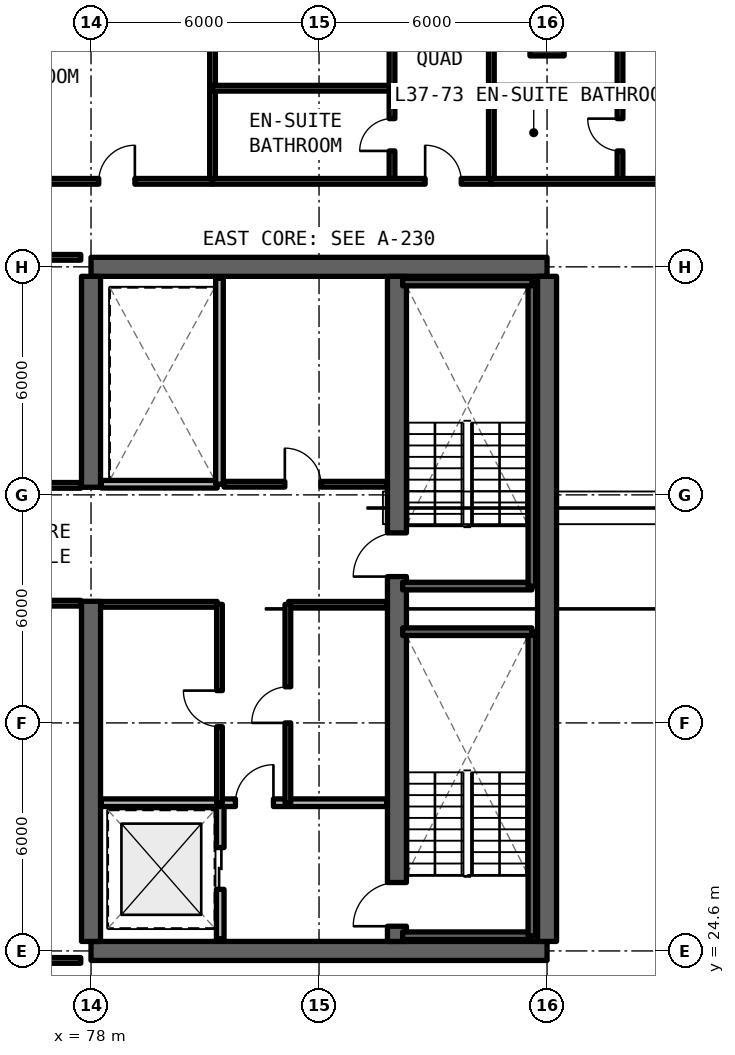
"""IFC4 building model, lengths in metres.
Left out: names, types, materials, properties, quantities, classifications, styles, units other than length and angle.
Written with IfcOpenShell. Run it as: python <this file> out.ifc"""

import sys

from ifc_helpers import new_model, si_unit, direction, frame, frame_2d, origin, origin_2d, place, context, subcontext, project, spatial, rectangle, extrude, element, fill, save


model = new_model("IFC4")
c1 = context("Model", 3, precision=1e-05, world=origin(), true_north=direction((0.0, 1.0)))
c2 = subcontext(c1, "Body", "Model", "MODEL_VIEW")
j1 = project(units=[si_unit("LENGTHUNIT", "METRE"), si_unit("PLANEANGLEUNIT", "RADIAN")], contexts=[c1])
p1 = place(None, origin())
s1 = spatial("IfcSite", under=j1, at=p1, CompositionType="ELEMENT")
p2 = place(p1, origin())
s2 = spatial("IfcBuilding", under=s1, at=p2, CompositionType="ELEMENT")
p3 = place(p2, frame((0.0, 0.0, 135.3)))
s3 = spatial("IfcBuildingStorey", under=s2, at=p3, CompositionType="ELEMENT", Elevation=135.3)
for number, where, z_axis, x_axis in (
    (1, (78.0, 24.6, 0.0), (0.0, 0.0, 1.0), (1.0, 0.0, 0.0)),
    (2, (90.0, 42.6, 0.0), (0.0, 0.0, 1.0), (-1.0, 0.0, 0.0)),
):
    element("IfcWall", number, at=place(p3, frame(where, z_axis=z_axis, x_axis=x_axis)), inside=s3, PredefinedType="SHEAR", context=c2, shape_type="SweptSolid", body=[
        extrude(rectangle(XDim=12.0, YDim=0.5, at=frame_2d((6.0, 0.0))), origin(), (0.0, 0.0, 1.0), 3.3),
    ])
p4 = place(p3, frame((90.0, 24.85, 0.0), z_axis=(0.0, 0.0, 1.0), x_axis=(0.0, 1.0, 0.0)))
e3 = element("IfcWall", 3, at=p4, inside=s3, PredefinedType="SHEAR", context=c2, shape_type="SweptSolid", body=[
    extrude(rectangle(XDim=17.5, YDim=0.5, at=frame_2d((8.75, 0.0))), origin(), (0.0, 0.0, 1.0), 3.3),
])
p5 = place(p3, frame((78.0, 24.85, 0.0), z_axis=(0.0, 0.0, 1.0), x_axis=(0.0, 1.0, 0.0)))
e4 = element("IfcWall", 4, at=p5, inside=s3, PredefinedType="SHEAR", context=c2, shape_type="SweptSolid", body=[
    extrude(rectangle(XDim=8.95, YDim=0.5, at=frame_2d((4.475, 0.0))), origin(), (0.0, 0.0, 1.0), 3.3),
])
p6 = place(p3, frame((78.0, 36.8, 0.0), z_axis=(0.0, 0.0, 1.0), x_axis=(0.0, 1.0, 0.0)))
e5 = element("IfcWall", 5, at=p6, inside=s3, PredefinedType="SHEAR", context=c2, shape_type="SweptSolid", body=[
    extrude(rectangle(XDim=5.55, YDim=0.5, at=frame_2d((2.775, 0.0))), origin(), (0.0, 0.0, 1.0), 3.3),
])
p7 = place(p3, frame((86.05, 24.85, 0.0), z_axis=(0.0, 0.0, 1.0), x_axis=(0.0, 1.0, 0.0)))
e6 = element("IfcWall", 6, at=p7, inside=s3, PredefinedType="SHEAR", context=c2, shape_type="SweptSolid", body=[
    extrude(rectangle(XDim=17.5, YDim=0.5, at=frame_2d((8.75, 0.0))), origin(), (0.0, 0.0, 1.0), 3.3),
])
p8 = place(p7, frame((0.4, 0.0, 0.0)))
e7 = element("IfcOpeningElement", 7, at=p8, cuts=e6, PredefinedType="OPENING", context=c2, shape_type="SweptSolid", body=[
    extrude(rectangle(XDim=1.15, YDim=2.15, at=frame_2d((0.575, 1.075))), frame((0.0, 0.26, 0.0), z_axis=(0.0, -1.0, 0.0), x_axis=(1.0, 0.0, 0.0)), (0.0, 0.0, 1.0), 0.52),
])
p9 = place(p7, frame((9.6, 0.0, 0.0)))
e8 = element("IfcOpeningElement", 8, at=p9, cuts=e6, PredefinedType="OPENING", context=c2, shape_type="SweptSolid", body=[
    extrude(rectangle(XDim=1.15, YDim=2.15, at=frame_2d((0.575, 1.075))), frame((0.0, 0.26, 0.0), z_axis=(0.0, -1.0, 0.0), x_axis=(1.0, 0.0, 0.0)), (0.0, 0.0, 1.0), 0.52),
])
p10 = place(p3, frame((90.0, 48.6, 0.0), z_axis=(0.0, 0.0, 1.0), x_axis=(1.0, 0.0, 0.0)))
e9 = element("IfcColumn", 9, at=p10, inside=s3, PredefinedType="COLUMN", context=c2, shape_type="SweptSolid", body=[
    extrude(rectangle(XDim=0.9, YDim=0.9, at=origin_2d()), origin(), (0.0, 0.0, 1.0), 3.3),
])
p11 = place(p3, frame((81.4, 24.92, 0.0), z_axis=(0.0, 0.0, 1.0), x_axis=(0.0, 1.0, 0.0)))
e10 = element("IfcWall", 10, at=p11, inside=s3, PredefinedType="SOLIDWALL", context=c2, shape_type="SweptSolid", body=[
    extrude(rectangle(XDim=3.58, YDim=0.2, at=frame_2d((1.79, 0.0))), origin(), (0.0, 0.0, 1.0), 2.35),
])
p12 = place(p11, frame((1.3, 0.0, 0.0)))
e11 = element("IfcOpeningElement", 11, at=p12, cuts=e10, PredefinedType="OPENING", context=c2, shape_type="SweptSolid", body=[
    extrude(rectangle(XDim=1.1, YDim=2.2, at=frame_2d((0.55, 1.1))), frame((0.0, 0.11, 0.0), z_axis=(0.0, -1.0, 0.0), x_axis=(1.0, 0.0, 0.0)), (0.0, 0.0, 1.0), 0.22),
])
p13 = place(p3, frame((78.27, 28.5, 0.0), z_axis=(0.0, 0.0, 1.0), x_axis=(1.0, 0.0, 0.0)))
e12 = element("IfcWall", 12, at=p13, inside=s3, PredefinedType="SOLIDWALL", context=c2, shape_type="SweptSolid", body=[
    extrude(rectangle(XDim=7.51, YDim=0.2, at=frame_2d((3.755, 0.0))), origin(), (0.0, 0.0, 1.0), 2.35),
])
p14 = place(p13, frame((3.53, 0.0, 0.0)))
e13 = element("IfcOpeningElement", 13, at=p14, cuts=e12, PredefinedType="OPENING", context=c2, shape_type="SweptSolid", body=[
    extrude(rectangle(XDim=1.0, YDim=2.15, at=frame_2d((0.5, 1.075))), frame((0.0, 0.11, 0.0), z_axis=(0.0, -1.0, 0.0), x_axis=(1.0, 0.0, 0.0)), (0.0, 0.0, 1.0), 0.22),
])
p15 = place(p3, frame((83.2, 33.72, 0.0), z_axis=(0.0, 0.0, 1.0), x_axis=(1.0, 0.0, 0.0)))
e14 = element("IfcWall", 14, at=p15, inside=s3, PredefinedType="SOLIDWALL", context=c2, shape_type="SweptSolid", body=[
    extrude(rectangle(XDim=2.58, YDim=0.15, at=frame_2d((1.29, 0.0))), origin(), (0.0, 0.0, 1.0), 2.35),
])
p16 = place(p3, frame((83.18, 28.5, 0.0), z_axis=(0.0, 0.0, 1.0), x_axis=(0.0, 1.0, 0.0)))
e15 = element("IfcWall", 15, at=p16, inside=s3, PredefinedType="SOLIDWALL", context=c2, shape_type="SweptSolid", body=[
    extrude(rectangle(XDim=5.22, YDim=0.15, at=frame_2d((2.61, 0.0))), origin(), (0.0, 0.0, 1.0), 2.35),
])
p17 = place(p16, frame((2.1, 0.0, 0.0)))
e16 = element("IfcOpeningElement", 16, at=p17, cuts=e15, PredefinedType="OPENING", context=c2, shape_type="SweptSolid", body=[
    extrude(rectangle(XDim=0.95, YDim=2.15, at=frame_2d((0.475, 1.075))), frame((0.0, 0.085, 0.0), z_axis=(0.0, -1.0, 0.0), x_axis=(1.0, 0.0, 0.0)), (0.0, 0.0, 1.0), 0.17),
])
p18 = place(p3, frame((78.27, 33.72, 0.0), z_axis=(0.0, 0.0, 1.0), x_axis=(1.0, 0.0, 0.0)))
e17 = element("IfcWall", 17, at=p18, inside=s3, PredefinedType="SOLIDWALL", context=c2, shape_type="SweptSolid", body=[
    extrude(rectangle(XDim=3.05, YDim=0.15, at=frame_2d((1.525, 0.0))), origin(), (0.0, 0.0, 1.0), 2.35),
])
p19 = place(p3, frame((81.38, 28.5, 0.0), z_axis=(0.0, 0.0, 1.0), x_axis=(0.0, 1.0, 0.0)))
e18 = element("IfcWall", 18, at=p19, inside=s3, PredefinedType="SOLIDWALL", context=c2, shape_type="SweptSolid", body=[
    extrude(rectangle(XDim=5.22, YDim=0.15, at=frame_2d((2.61, 0.0))), origin(), (0.0, 0.0, 1.0), 2.35),
])
p20 = place(p19, frame((2.0, 0.0, 0.0)))
e19 = element("IfcOpeningElement", 19, at=p20, cuts=e18, PredefinedType="OPENING", context=c2, shape_type="SweptSolid", body=[
    extrude(rectangle(XDim=0.95, YDim=2.15, at=frame_2d((0.475, 1.075))), frame((0.0, 0.085, 0.0), z_axis=(0.0, -1.0, 0.0), x_axis=(1.0, 0.0, 0.0)), (0.0, 0.0, 1.0), 0.17),
])
p21 = place(p3, frame((81.5, 36.88, 0.0), z_axis=(0.0, 0.0, 1.0), x_axis=(1.0, 0.0, 0.0)))
e20 = element("IfcWall", 20, at=p21, inside=s3, PredefinedType="SOLIDWALL", context=c2, shape_type="SweptSolid", body=[
    extrude(rectangle(XDim=4.28, YDim=0.15, at=frame_2d((2.14, 0.0))), origin(), (0.0, 0.0, 1.0), 2.35),
])
p22 = place(p21, frame((1.6, 0.0, 0.0)))
e21 = element("IfcOpeningElement", 21, at=p22, cuts=e20, PredefinedType="OPENING", context=c2, shape_type="SweptSolid", body=[
    extrude(rectangle(XDim=0.95, YDim=2.15, at=frame_2d((0.475, 1.075))), frame((0.0, 0.085, 0.0), z_axis=(0.0, -1.0, 0.0), x_axis=(1.0, 0.0, 0.0)), (0.0, 0.0, 1.0), 0.17),
])
p23 = place(p3, frame((78.27, 36.88, 0.0), z_axis=(0.0, 0.0, 1.0), x_axis=(1.0, 0.0, 0.0)))
e22 = element("IfcWall", 22, at=p23, inside=s3, PredefinedType="SOLIDWALL", context=c2, shape_type="SweptSolid", body=[
    extrude(rectangle(XDim=3.05, YDim=0.2, at=frame_2d((1.525, 0.0))), origin(), (0.0, 0.0, 1.0), 2.35),
])
p24 = place(p3, frame((81.38, 36.88, 0.0), z_axis=(0.0, 0.0, 1.0), x_axis=(0.0, 1.0, 0.0)))
e23 = element("IfcWall", 23, at=p24, inside=s3, PredefinedType="SOLIDWALL", context=c2, shape_type="SweptSolid", body=[
    extrude(rectangle(XDim=5.42, YDim=0.2, at=frame_2d((2.71, 0.0))), origin(), (0.0, 0.0, 1.0), 2.35),
])
p25 = place(p3, frame((69.85, 24.35, 0.0), z_axis=(0.0, 0.0, 1.0), x_axis=(1.0, 0.0, 0.0)))
e24 = element("IfcWall", 24, at=p25, inside=s3, PredefinedType="SOLIDWALL", context=c2, shape_type="SweptSolid", body=[
    extrude(rectangle(XDim=7.88, YDim=0.15, at=frame_2d((3.94, 0.0))), origin(), (0.0, 0.0, 1.0), 2.35),
])
p26 = place(p3, frame((69.85, 33.75, 0.0), z_axis=(0.0, 0.0, 1.0), x_axis=(1.0, 0.0, 0.0)))
e25 = element("IfcWall", 25, at=p26, inside=s3, PredefinedType="SOLIDWALL", context=c2, shape_type="SweptSolid", body=[
    extrude(rectangle(XDim=7.88, YDim=0.15, at=frame_2d((3.94, 0.0))), origin(), (0.0, 0.0, 1.0), 2.35),
])
p27 = place(p26, frame((3.465, 0.0, 0.0)))
e26 = element("IfcOpeningElement", 26, at=p27, cuts=e25, PredefinedType="OPENING", context=c2, shape_type="SweptSolid", body=[
    extrude(rectangle(XDim=0.95, YDim=2.15, at=frame_2d((0.475, 1.075))), frame((0.0, 0.085, 0.0), z_axis=(0.0, -1.0, 0.0), x_axis=(1.0, 0.0, 0.0)), (0.0, 0.0, 1.0), 0.17),
])
p28 = place(p3, frame((69.85, 36.85, 0.0), z_axis=(0.0, 0.0, 1.0), x_axis=(1.0, 0.0, 0.0)))
e27 = element("IfcWall", 27, at=p28, inside=s3, PredefinedType="SOLIDWALL", context=c2, shape_type="SweptSolid", body=[
    extrude(rectangle(XDim=7.88, YDim=0.15, at=frame_2d((3.94, 0.0))), origin(), (0.0, 0.0, 1.0), 2.35),
])
p29 = place(p28, frame((3.465, 0.0, 0.0)))
e28 = element("IfcOpeningElement", 28, at=p29, cuts=e27, PredefinedType="OPENING", context=c2, shape_type="SweptSolid", body=[
    extrude(rectangle(XDim=0.95, YDim=2.15, at=frame_2d((0.475, 1.075))), frame((0.0, 0.085, 0.0), z_axis=(0.0, -1.0, 0.0), x_axis=(1.0, 0.0, 0.0)), (0.0, 0.0, 1.0), 0.17),
])
p30 = place(p3, frame((69.85, 42.85, 0.0), z_axis=(0.0, 0.0, 1.0), x_axis=(1.0, 0.0, 0.0)))
e29 = element("IfcWall", 29, at=p30, inside=s3, PredefinedType="SOLIDWALL", context=c2, shape_type="SweptSolid", body=[
    extrude(rectangle(XDim=7.88, YDim=0.15, at=frame_2d((3.94, 0.0))), origin(), (0.0, 0.0, 1.0), 2.35),
])
p31 = place(p3, frame((81.197, 44.85, 0.0), z_axis=(0.0, 0.0, 1.0), x_axis=(0.0, 1.0, 0.0)))
e30 = element("IfcWall", 30, at=p31, inside=s3, PredefinedType="SOLIDWALL", context=c2, shape_type="SweptSolid", body=[
    extrude(rectangle(XDim=10.2, YDim=0.15, at=frame_2d((5.1, 0.0))), origin(), (0.0, 0.0, 1.0), 2.35),
])
p32 = place(p3, frame((74.132, 44.85, 0.0), z_axis=(0.0, 0.0, 1.0), x_axis=(1.0, 0.0, 0.0)))
e31 = element("IfcWall", 31, at=p32, inside=s3, PredefinedType="SOLIDWALL", context=c2, shape_type="SweptSolid", body=[
    extrude(rectangle(XDim=7.066, YDim=0.15, at=frame_2d((3.533, 0.0))), origin(), (0.0, 0.0, 1.0), 2.35),
])
p33 = place(p32, frame((4.072, 0.0, 0.0)))
e32 = element("IfcOpeningElement", 32, at=p33, cuts=e31, PredefinedType="OPENING", context=c2, shape_type="SweptSolid", body=[
    extrude(rectangle(XDim=0.95, YDim=2.15, at=frame_2d((0.475, 1.075))), frame((0.0, 0.085, 0.0), z_axis=(0.0, -1.0, 0.0), x_axis=(1.0, 0.0, 0.0)), (0.0, 0.0, 1.0), 0.17),
])
p34 = place(p3, frame((88.534, 44.85, 0.0), z_axis=(0.0, 0.0, 1.0), x_axis=(0.0, 1.0, 0.0)))
e33 = element("IfcWall", 33, at=p34, inside=s3, PredefinedType="SOLIDWALL", context=c2, shape_type="SweptSolid", body=[
    extrude(rectangle(XDim=10.2, YDim=0.15, at=frame_2d((5.1, 0.0))), origin(), (0.0, 0.0, 1.0), 2.35),
])
p35 = place(p3, frame((81.197, 47.3, 0.0), z_axis=(0.0, 0.0, 1.0), x_axis=(1.0, 0.0, 0.0)))
e34 = element("IfcWall", 34, at=p35, inside=s3, PredefinedType="PARTITIONING", context=c2, shape_type="SweptSolid", body=[
    extrude(rectangle(XDim=4.723, YDim=0.15, at=frame_2d((2.361, 0.0))), origin(), (0.0, 0.0, 1.0), 2.35),
])
p36 = place(p3, frame((85.92, 44.85, 0.0), z_axis=(0.0, 0.0, 1.0), x_axis=(0.0, 1.0, 0.0)))
e35 = element("IfcWall", 35, at=p36, inside=s3, PredefinedType="PARTITIONING", context=c2, shape_type="SweptSolid", body=[
    extrude(rectangle(XDim=10.2, YDim=0.15, at=frame_2d((5.1, 0.0))), origin(), (0.0, 0.0, 1.0), 2.35),
])
p37 = place(p36, frame((0.8, 0.0, 0.0)))
e36 = element("IfcOpeningElement", 36, at=p37, cuts=e35, PredefinedType="OPENING", context=c2, shape_type="SweptSolid", body=[
    extrude(rectangle(XDim=0.85, YDim=2.1, at=frame_2d((0.425, 1.05))), frame((0.0, 0.085, 0.0), z_axis=(0.0, -1.0, 0.0), x_axis=(1.0, 0.0, 0.0)), (0.0, 0.0, 1.0), 0.17),
])
p38 = place(p36, frame((5.21, 0.0, 0.0)))
e37 = element("IfcOpeningElement", 37, at=p38, cuts=e35, PredefinedType="OPENING", context=c2, shape_type="SweptSolid", body=[
    extrude(rectangle(XDim=0.85, YDim=2.1, at=frame_2d((0.425, 1.05))), frame((0.0, 0.085, 0.0), z_axis=(0.0, -1.0, 0.0), x_axis=(1.0, 0.0, 0.0)), (0.0, 0.0, 1.0), 0.17),
])
p39 = place(p3, frame((81.197, 44.85, 0.0), z_axis=(0.0, 0.0, 1.0), x_axis=(1.0, 0.0, 0.0)))
e38 = element("IfcWall", 38, at=p39, inside=s3, PredefinedType="SOLIDWALL", context=c2, shape_type="SweptSolid", body=[
    extrude(rectangle(XDim=7.337, YDim=0.15, at=frame_2d((3.668, 0.0))), origin(), (0.0, 0.0, 1.0), 2.35),
])
p40 = place(p39, frame((5.595, 0.0, 0.0)))
e39 = element("IfcOpeningElement", 39, at=p40, cuts=e38, PredefinedType="OPENING", context=c2, shape_type="SweptSolid", body=[
    extrude(rectangle(XDim=0.95, YDim=2.15, at=frame_2d((0.475, 1.075))), frame((0.0, 0.085, 0.0), z_axis=(0.0, -1.0, 0.0), x_axis=(1.0, 0.0, 0.0)), (0.0, 0.0, 1.0), 0.17),
])
p41 = place(p3, frame((88.534, 47.3, 0.0), z_axis=(0.0, 0.0, 1.0), x_axis=(1.0, 0.0, 0.0)))
e40 = element("IfcWall", 40, at=p41, inside=s3, PredefinedType="PARTITIONING", context=c2, shape_type="SweptSolid", body=[
    extrude(rectangle(XDim=3.385, YDim=0.15, at=frame_2d((1.693, 0.0))), origin(), (0.0, 0.0, 1.0), 2.35),
])
p42 = place(p3, frame((91.92, 44.85, 0.0), z_axis=(0.0, 0.0, 1.0), x_axis=(0.0, 1.0, 0.0)))
e41 = element("IfcWall", 41, at=p42, inside=s3, PredefinedType="PARTITIONING", context=c2, shape_type="SweptSolid", body=[
    extrude(rectangle(XDim=10.2, YDim=0.15, at=frame_2d((5.1, 0.0))), origin(), (0.0, 0.0, 1.0), 2.35),
])
p43 = place(p42, frame((0.8, 0.0, 0.0)))
e42 = element("IfcOpeningElement", 42, at=p43, cuts=e41, PredefinedType="OPENING", context=c2, shape_type="SweptSolid", body=[
    extrude(rectangle(XDim=0.85, YDim=2.1, at=frame_2d((0.425, 1.05))), frame((0.0, 0.085, 0.0), z_axis=(0.0, -1.0, 0.0), x_axis=(1.0, 0.0, 0.0)), (0.0, 0.0, 1.0), 0.17),
])
p44 = place(p42, frame((5.21, 0.0, 0.0)))
e43 = element("IfcOpeningElement", 43, at=p44, cuts=e41, PredefinedType="OPENING", context=c2, shape_type="SweptSolid", body=[
    extrude(rectangle(XDim=0.85, YDim=2.1, at=frame_2d((0.425, 1.05))), frame((0.0, 0.085, 0.0), z_axis=(0.0, -1.0, 0.0), x_axis=(1.0, 0.0, 0.0)), (0.0, 0.0, 1.0), 0.17),
])
p45 = place(p3, frame((88.534, 44.85, 0.0), z_axis=(0.0, 0.0, 1.0), x_axis=(1.0, 0.0, 0.0)))
e44 = element("IfcWall", 44, at=p45, inside=s3, PredefinedType="SOLIDWALL", context=c2, shape_type="SweptSolid", body=[
    extrude(rectangle(XDim=7.066, YDim=0.15, at=frame_2d((3.533, 0.0))), origin(), (0.0, 0.0, 1.0), 2.35),
])
p46 = place(p45, frame((4.791, 0.0, 0.0)))
e45 = element("IfcOpeningElement", 45, at=p46, cuts=e44, PredefinedType="OPENING", context=c2, shape_type="SweptSolid", body=[
    extrude(rectangle(XDim=0.95, YDim=2.15, at=frame_2d((0.475, 1.075))), frame((0.0, 0.085, 0.0), z_axis=(0.0, -1.0, 0.0), x_axis=(1.0, 0.0, 0.0)), (0.0, 0.0, 1.0), 0.17),
])
p47 = place(p3, frame((86.2, 25.0, 0.0), z_axis=(0.0, 0.0, 1.0), x_axis=(1.0, 0.0, 0.0)))
e46 = element("IfcWall", 46, at=p47, inside=s3, PredefinedType="SOLIDWALL", context=c2, shape_type="SweptSolid", body=[
    extrude(rectangle(XDim=3.4, YDim=0.2, at=frame_2d((1.7, 0.0))), origin(), (0.0, 0.0, 1.0), 3.3),
])
p48 = place(p3, frame((89.6, 25.0, 0.0), z_axis=(0.0, 0.0, 1.0), x_axis=(0.0, 1.0, 0.0)))
e47 = element("IfcWall", 47, at=p48, inside=s3, PredefinedType="SOLIDWALL", context=c2, shape_type="SweptSolid", body=[
    extrude(rectangle(XDim=8.0, YDim=0.2, at=frame_2d((4.0, 0.0))), origin(), (0.0, 0.0, 1.0), 3.3),
])
for number, where, z_axis, x_axis in (
    (48, (89.6, 33.0, 0.0), (0.0, 0.0, 1.0), (-1.0, 0.0, 0.0)),
    (49, (86.2, 34.2, 0.0), (0.0, 0.0, 1.0), (1.0, 0.0, 0.0)),
):
    element("IfcWall", number, at=place(p3, frame(where, z_axis=z_axis, x_axis=x_axis)), inside=s3, PredefinedType="SOLIDWALL", context=c2, shape_type="SweptSolid", body=[
        extrude(rectangle(XDim=3.4, YDim=0.2, at=frame_2d((1.7, 0.0))), origin(), (0.0, 0.0, 1.0), 3.3),
    ])
p49 = place(p3, frame((89.6, 34.2, 0.0), z_axis=(0.0, 0.0, 1.0), x_axis=(0.0, 1.0, 0.0)))
e50 = element("IfcWall", 50, at=p49, inside=s3, PredefinedType="SOLIDWALL", context=c2, shape_type="SweptSolid", body=[
    extrude(rectangle(XDim=8.0, YDim=0.2, at=frame_2d((4.0, 0.0))), origin(), (0.0, 0.0, 1.0), 3.3),
])
p50 = place(p3, frame((89.6, 42.2, 0.0), z_axis=(0.0, 0.0, 1.0), x_axis=(-1.0, 0.0, 0.0)))
e51 = element("IfcWall", 51, at=p50, inside=s3, PredefinedType="SOLIDWALL", context=c2, shape_type="SweptSolid", body=[
    extrude(rectangle(XDim=3.4, YDim=0.2, at=frame_2d((1.7, 0.0))), origin(), (0.0, 0.0, 1.0), 3.3),
])
p51 = place(p12, origin())
e52 = element("IfcDoor", 52, at=p51, inside=s3, OperationType="SLIDING_TO_LEFT", PredefinedType="DOOR", context=c2, shape_type="SweptSolid", body=[
    extrude(rectangle(XDim=1.1, YDim=2.2, at=frame_2d((0.55, 1.1))), frame((0.0, 0.025, 0.0), z_axis=(0.0, -1.0, 0.0), x_axis=(1.0, 0.0, 0.0)), (0.0, 0.0, 1.0), 0.05),
])
fill(e11, e52)
p52 = place(p14, origin())
e53 = element("IfcDoor", 53, at=p52, inside=s3, OperationType="SINGLE_SWING_RIGHT", PredefinedType="DOOR", context=c2, shape_type="SweptSolid", body=[
    extrude(rectangle(XDim=1.0, YDim=2.15, at=frame_2d((0.5, 1.075))), frame((0.0, 0.025, 0.0), z_axis=(0.0, -1.0, 0.0), x_axis=(1.0, 0.0, 0.0)), (0.0, 0.0, 1.0), 0.05),
])
fill(e13, e53)
p53 = place(p17, origin())
e54 = element("IfcDoor", 54, at=p53, inside=s3, OperationType="SINGLE_SWING_LEFT", PredefinedType="DOOR", context=c2, shape_type="SweptSolid", body=[
    extrude(rectangle(XDim=0.95, YDim=2.15, at=frame_2d((0.475, 1.075))), frame((0.0, 0.025, 0.0), z_axis=(0.0, -1.0, 0.0), x_axis=(1.0, 0.0, 0.0)), (0.0, 0.0, 1.0), 0.05),
])
fill(e16, e54)
p54 = place(p20, origin())
e55 = element("IfcDoor", 55, at=p54, inside=s3, OperationType="SINGLE_SWING_RIGHT", PredefinedType="DOOR", context=c2, shape_type="SweptSolid", body=[
    extrude(rectangle(XDim=0.95, YDim=2.15, at=frame_2d((0.475, 1.075))), frame((0.0, 0.025, 0.0), z_axis=(0.0, -1.0, 0.0), x_axis=(1.0, 0.0, 0.0)), (0.0, 0.0, 1.0), 0.05),
])
fill(e19, e55)
p55 = place(p22, origin())
e56 = element("IfcDoor", 56, at=p55, inside=s3, OperationType="SINGLE_SWING_LEFT", PredefinedType="DOOR", context=c2, shape_type="SweptSolid", body=[
    extrude(rectangle(XDim=0.95, YDim=2.15, at=frame_2d((0.475, 1.075))), frame((0.0, 0.025, 0.0), z_axis=(0.0, -1.0, 0.0), x_axis=(1.0, 0.0, 0.0)), (0.0, 0.0, 1.0), 0.05),
])
fill(e21, e56)
p56 = place(p33, origin())
e57 = element("IfcDoor", 57, at=p56, inside=s3, OperationType="SINGLE_SWING_RIGHT", PredefinedType="DOOR", context=c2, shape_type="SweptSolid", body=[
    extrude(rectangle(XDim=0.95, YDim=2.15, at=frame_2d((0.475, 1.075))), frame((0.0, 0.025, 0.0), z_axis=(0.0, -1.0, 0.0), x_axis=(1.0, 0.0, 0.0)), (0.0, 0.0, 1.0), 0.05),
])
fill(e32, e57)
p57 = place(p37, origin())
e58 = element("IfcDoor", 58, at=p57, inside=s3, OperationType="SINGLE_SWING_LEFT", PredefinedType="DOOR", context=c2, shape_type="SweptSolid", body=[
    extrude(rectangle(XDim=0.85, YDim=2.1, at=frame_2d((0.425, 1.05))), frame((0.0, 0.025, 0.0), z_axis=(0.0, -1.0, 0.0), x_axis=(1.0, 0.0, 0.0)), (0.0, 0.0, 1.0), 0.05),
])
fill(e36, e58)
p58 = place(p40, origin())
e59 = element("IfcDoor", 59, at=p58, inside=s3, OperationType="SINGLE_SWING_LEFT", PredefinedType="DOOR", context=c2, shape_type="SweptSolid", body=[
    extrude(rectangle(XDim=0.95, YDim=2.15, at=frame_2d((0.475, 1.075))), frame((0.0, 0.025, 0.0), z_axis=(0.0, -1.0, 0.0), x_axis=(1.0, 0.0, 0.0)), (0.0, 0.0, 1.0), 0.05),
])
fill(e39, e59)
p59 = place(p43, origin())
e60 = element("IfcDoor", 60, at=p59, inside=s3, OperationType="SINGLE_SWING_RIGHT", PredefinedType="DOOR", context=c2, shape_type="SweptSolid", body=[
    extrude(rectangle(XDim=0.85, YDim=2.1, at=frame_2d((0.425, 1.05))), frame((0.0, 0.025, 0.0), z_axis=(0.0, -1.0, 0.0), x_axis=(1.0, 0.0, 0.0)), (0.0, 0.0, 1.0), 0.05),
])
fill(e42, e60)
p60 = place(p8, origin())
e61 = element("IfcDoor", 61, at=p60, inside=s3, OperationType="SINGLE_SWING_LEFT", PredefinedType="DOOR", context=c2, shape_type="SweptSolid", body=[
    extrude(rectangle(XDim=1.15, YDim=2.15, at=frame_2d((0.575, 1.075))), frame((0.0, 0.025, 0.0), z_axis=(0.0, -1.0, 0.0), x_axis=(1.0, 0.0, 0.0)), (0.0, 0.0, 1.0), 0.05),
])
fill(e7, e61)
p61 = place(p9, origin())
e62 = element("IfcDoor", 62, at=p61, inside=s3, OperationType="SINGLE_SWING_RIGHT", PredefinedType="DOOR", context=c2, shape_type="SweptSolid", body=[
    extrude(rectangle(XDim=1.15, YDim=2.15, at=frame_2d((0.575, 1.075))), frame((0.0, 0.025, 0.0), z_axis=(0.0, -1.0, 0.0), x_axis=(1.0, 0.0, 0.0)), (0.0, 0.0, 1.0), 0.05),
])
fill(e8, e62)
save(model, sys.argv[1])
